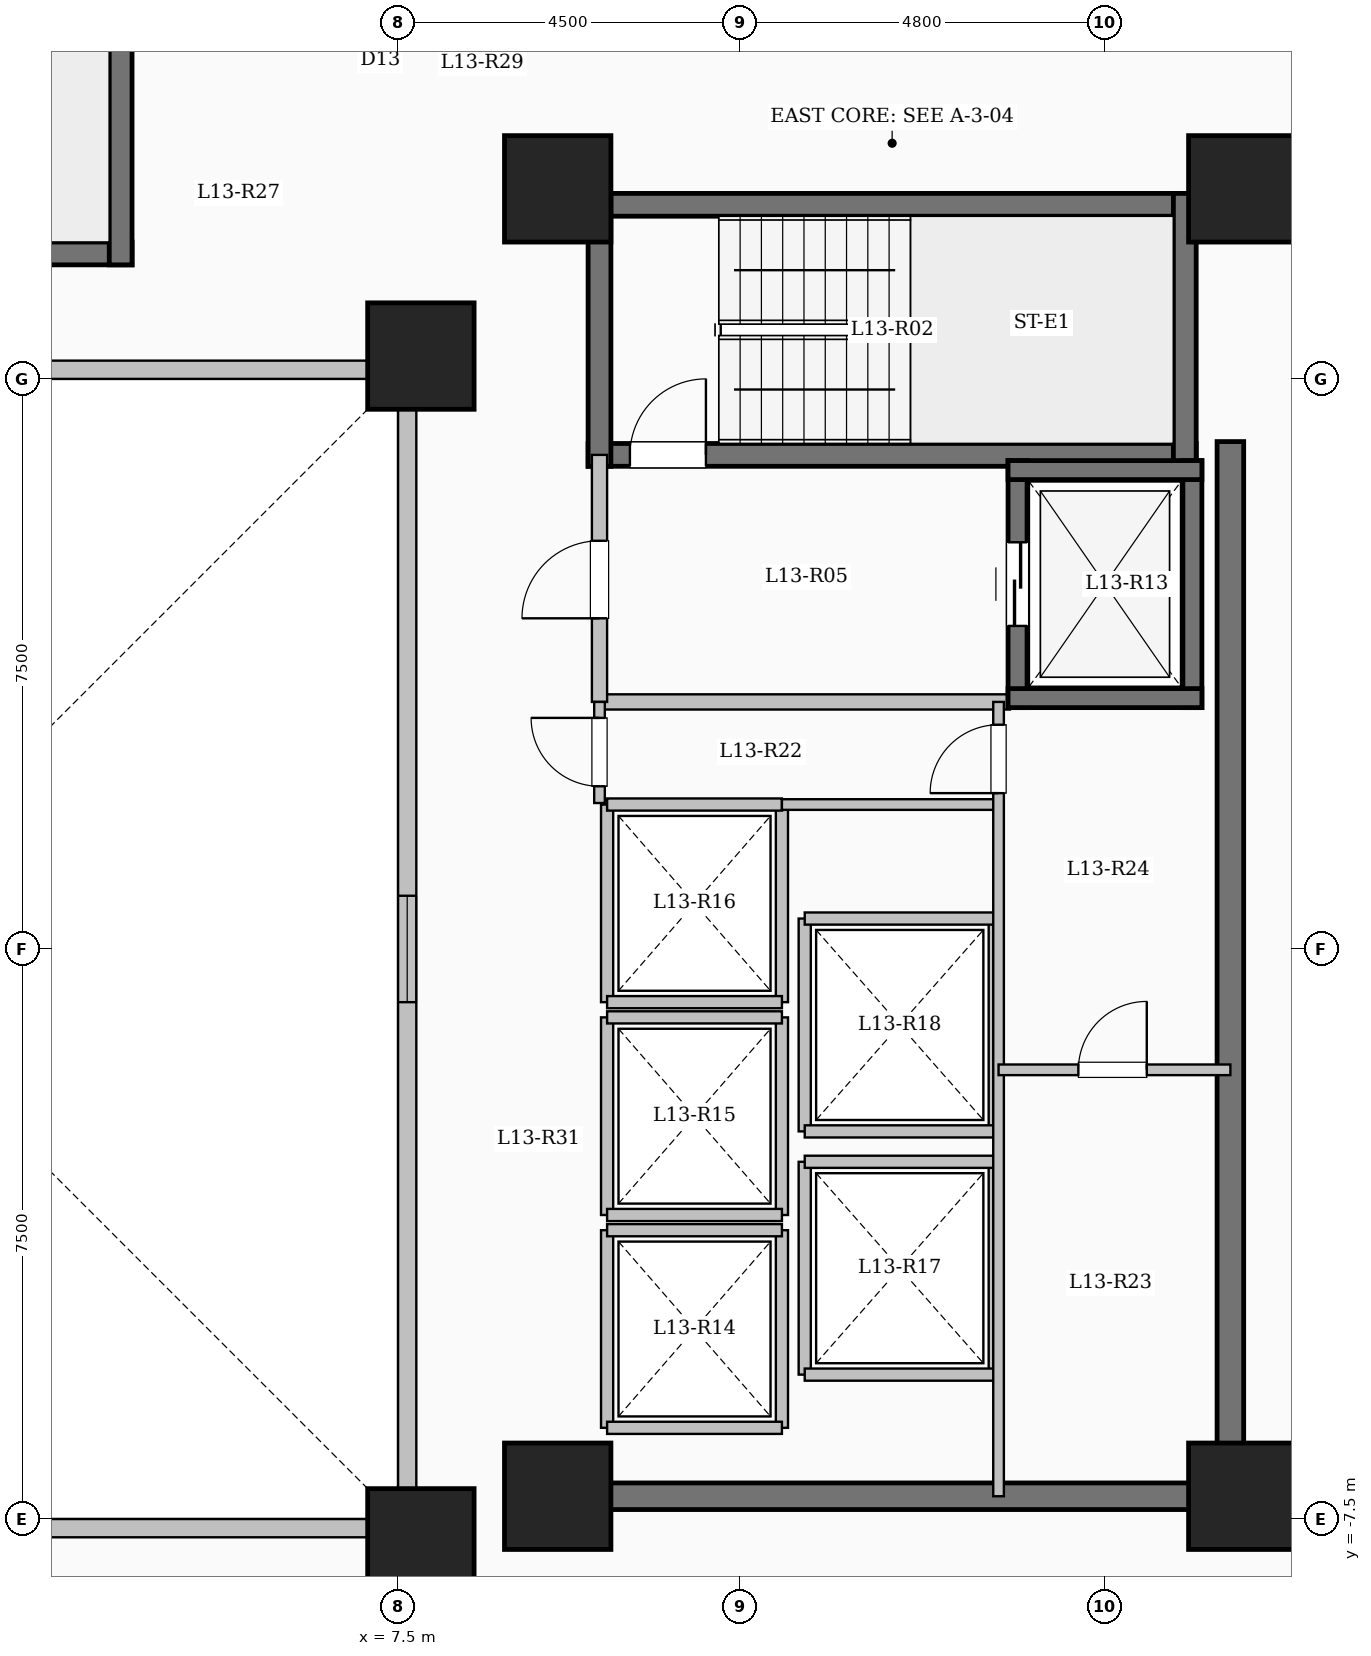
"""IFC4 building model, lengths in metres.
Left out: names, types, materials, properties, quantities, classifications, styles, units other than length and angle.
Written with IfcOpenShell. Run it as: python <this file> out.ifc"""

import sys

from ifc_helpers import new_model, si_unit, direction, frame, frame_2d, origin, origin_2d, place, context, subcontext, project, spatial, rectangle, extrude, element, fill, save


model = new_model("IFC4")
c1 = context("Model", 3, precision=1e-05, world=origin(), true_north=direction((0.0, 1.0)))
c2 = subcontext(c1, "Body", "Model", "MODEL_VIEW")
j1 = project(units=[si_unit("LENGTHUNIT", "METRE"), si_unit("PLANEANGLEUNIT", "RADIAN")], contexts=[c1])
p1 = place(None, origin())
s1 = spatial("IfcSite", under=j1, at=p1, CompositionType="ELEMENT")
p2 = place(p1, origin())
s2 = spatial("IfcBuilding", under=s1, at=p2, CompositionType="ELEMENT")
p3 = place(p2, frame((0.0, 0.0, 50.8)))
s3 = spatial("IfcBuildingStorey", under=s2, at=p3, CompositionType="ELEMENT", Elevation=50.8)
for number, where, z_axis, x_axis in (
    (1, (7.8, -7.8, 0.0), (0.0, 0.0, 1.0), (1.0, 0.0, 0.0)),
    (2, (7.8, 7.8, 0.0), (0.0, 0.0, 1.0), (1.0, 0.0, 0.0)),
    (3, (9.6, -7.2, 0.0), (0.0, 0.0, 1.0), (1.0, 0.0, 0.0)),
    (4, (9.6, 10.0, 0.0), (0.0, 0.0, 1.0), (1.0, 0.0, 0.0)),
    (5, (18.6, -7.2, 0.0), (0.0, 0.0, 1.0), (1.0, 0.0, 0.0)),
    (6, (18.6, 10.0, 0.0), (0.0, 0.0, 1.0), (1.0, 0.0, 0.0)),
):
    element("IfcColumn", number, at=place(p3, frame(where, z_axis=z_axis, x_axis=x_axis)), inside=s3, PredefinedType="COLUMN", context=c2, shape_type="SweptSolid", body=[
        extrude(rectangle(XDim=1.4, YDim=1.4, at=origin_2d()), origin(), (0.0, 0.0, 1.0), 3.35),
    ])
p4 = place(p3, frame((-7.62, -7.62, 0.0), z_axis=(0.0, 0.0, 1.0), x_axis=(1.0, 0.0, 0.0)))
e7 = element("IfcWall", 7, at=p4, inside=s3, PredefinedType="SOLIDWALL", context=c2, shape_type="SweptSolid", body=[
    extrude(rectangle(XDim=15.24, YDim=0.24, at=frame_2d((7.62, 0.0))), origin(), (0.0, 0.0, 1.0), 3.1),
])
p5 = place(p4, frame((6.92, 0.0, 0.95)))
e8 = element("IfcOpeningElement", 8, at=p5, cuts=e7, PredefinedType="OPENING", context=c2, shape_type="SweptSolid", body=[
    extrude(rectangle(XDim=1.4, YDim=1.5, at=frame_2d((0.7, 0.75))), frame((0.0, 0.13, 0.0), z_axis=(0.0, -1.0, 0.0), x_axis=(1.0, 0.0, 0.0)), (0.0, 0.0, 1.0), 0.26),
])
p6 = place(p3, frame((7.62, -7.62, 0.0), z_axis=(0.0, 0.0, 1.0), x_axis=(0.0, 1.0, 0.0)))
e9 = element("IfcWall", 9, at=p6, inside=s3, PredefinedType="SOLIDWALL", context=c2, shape_type="SweptSolid", body=[
    extrude(rectangle(XDim=15.24, YDim=0.24, at=frame_2d((7.62, 0.0))), origin(), (0.0, 0.0, 1.0), 3.1),
])
p7 = place(p6, frame((6.92, 0.0, 0.95)))
e10 = element("IfcOpeningElement", 10, at=p7, cuts=e9, PredefinedType="OPENING", context=c2, shape_type="SweptSolid", body=[
    extrude(rectangle(XDim=1.4, YDim=1.5, at=frame_2d((0.7, 0.75))), frame((0.0, 0.13, 0.0), z_axis=(0.0, -1.0, 0.0), x_axis=(1.0, 0.0, 0.0)), (0.0, 0.0, 1.0), 0.26),
])
p8 = place(p3, frame((7.62, 7.62, 0.0), z_axis=(0.0, 0.0, 1.0), x_axis=(-1.0, 0.0, 0.0)))
e11 = element("IfcWall", 11, at=p8, inside=s3, PredefinedType="SOLIDWALL", context=c2, shape_type="SweptSolid", body=[
    extrude(rectangle(XDim=15.24, YDim=0.24, at=frame_2d((7.62, 0.0))), origin(), (0.0, 0.0, 1.0), 3.1),
])
p9 = place(p8, frame((6.92, 0.0, 0.95)))
e12 = element("IfcOpeningElement", 12, at=p9, cuts=e11, PredefinedType="OPENING", context=c2, shape_type="SweptSolid", body=[
    extrude(rectangle(XDim=1.4, YDim=1.5, at=frame_2d((0.7, 0.75))), frame((0.0, 0.13, 0.0), z_axis=(0.0, -1.0, 0.0), x_axis=(1.0, 0.0, 0.0)), (0.0, 0.0, 1.0), 0.26),
])
p10 = place(p3, frame((10.0, 9.79, 0.0), z_axis=(0.0, 0.0, 1.0), x_axis=(1.0, 0.0, 0.0)))
e13 = element("IfcWall", 13, at=p10, inside=s3, PredefinedType="SHEAR", context=c2, shape_type="SweptSolid", body=[
    extrude(rectangle(XDim=8.0, YDim=0.3, at=frame_2d((4.0, 0.0))), origin(), (0.0, 0.0, 1.0), 3.35),
])
p11 = place(p3, frame((10.0, 6.5, 0.0), z_axis=(0.0, 0.0, 1.0), x_axis=(1.0, 0.0, 0.0)))
e14 = element("IfcWall", 14, at=p11, inside=s3, PredefinedType="SHEAR", context=c2, shape_type="SweptSolid", body=[
    extrude(rectangle(XDim=8.0, YDim=0.3, at=frame_2d((4.0, 0.0))), origin(), (0.0, 0.0, 1.0), 3.35),
])
p12 = place(p11, frame((0.55, 0.0, 0.0)))
e15 = element("IfcOpeningElement", 15, at=p12, cuts=e14, PredefinedType="OPENING", context=c2, shape_type="SweptSolid", body=[
    extrude(rectangle(XDim=1.0, YDim=2.15, at=frame_2d((0.5, 1.075))), frame((0.0, 0.16, 0.0), z_axis=(0.0, -1.0, 0.0), x_axis=(1.0, 0.0, 0.0)), (0.0, 0.0, 1.0), 0.32),
])
for number, where, z_axis, x_axis in (
    (16, (10.15, 6.35, 0.0), (0.0, 0.0, 1.0), (0.0, 1.0, 0.0)),
    (17, (17.85, 6.35, 0.0), (0.0, 0.0, 1.0), (0.0, 1.0, 0.0)),
):
    element("IfcWall", number, at=place(p3, frame(where, z_axis=z_axis, x_axis=x_axis)), inside=s3, PredefinedType="SHEAR", context=c2, shape_type="SweptSolid", body=[
        extrude(rectangle(XDim=3.59, YDim=0.3, at=frame_2d((1.795, 0.0))), origin(), (0.0, 0.0, 1.0), 3.35),
    ])
p13 = place(p3, frame((-4.0, 9.15, 0.0), z_axis=(0.0, 0.0, 1.0), x_axis=(1.0, 0.0, 0.0)))
e18 = element("IfcWall", 18, at=p13, inside=s3, PredefinedType="SHEAR", context=c2, shape_type="SweptSolid", body=[
    extrude(rectangle(XDim=8.0, YDim=0.3, at=frame_2d((4.0, 0.0))), origin(), (0.0, 0.0, 1.0), 3.35),
])
p14 = place(p13, frame((0.55, 0.0, 0.0)))
e19 = element("IfcOpeningElement", 19, at=p14, cuts=e18, PredefinedType="OPENING", context=c2, shape_type="SweptSolid", body=[
    extrude(rectangle(XDim=1.0, YDim=2.15, at=frame_2d((0.5, 1.075))), frame((0.0, 0.16, 0.0), z_axis=(0.0, -1.0, 0.0), x_axis=(1.0, 0.0, 0.0)), (0.0, 0.0, 1.0), 0.32),
])
p15 = place(p3, frame((3.85, 9.0, 0.0), z_axis=(0.0, 0.0, 1.0), x_axis=(0.0, 1.0, 0.0)))
e20 = element("IfcWall", 20, at=p15, inside=s3, PredefinedType="SHEAR", context=c2, shape_type="SweptSolid", body=[
    extrude(rectangle(XDim=3.59, YDim=0.3, at=frame_2d((1.795, 0.0))), origin(), (0.0, 0.0, 1.0), 3.35),
])
p16 = place(p3, frame((10.15, 3.25, 0.0), z_axis=(0.0, 0.0, 1.0), x_axis=(1.0, 0.0, 0.0)))
e21 = element("IfcWall", 21, at=p16, inside=s3, PredefinedType="SOLIDWALL", context=c2, shape_type="SweptSolid", body=[
    extrude(rectangle(XDim=5.4, YDim=0.2, at=frame_2d((2.7, 0.0))), origin(), (0.0, 0.0, 1.0), 3.1),
])
p17 = place(p3, frame((10.15, 3.25, 0.0), z_axis=(0.0, 0.0, 1.0), x_axis=(0.0, 1.0, 0.0)))
e22 = element("IfcWall", 22, at=p17, inside=s3, PredefinedType="SOLIDWALL", context=c2, shape_type="SweptSolid", body=[
    extrude(rectangle(XDim=3.25, YDim=0.2, at=frame_2d((1.625, 0.0))), origin(), (0.0, 0.0, 1.0), 3.1),
])
p18 = place(p17, frame((1.1, 0.0, 0.0)))
e23 = element("IfcOpeningElement", 23, at=p18, cuts=e22, PredefinedType="OPENING", context=c2, shape_type="SweptSolid", body=[
    extrude(rectangle(XDim=1.02, YDim=2.15, at=frame_2d((0.51, 1.075))), frame((0.0, 0.11, 0.0), z_axis=(0.0, -1.0, 0.0), x_axis=(1.0, 0.0, 0.0)), (0.0, 0.0, 1.0), 0.22),
])
p19 = place(p3, frame((15.65, 3.175, 0.0), z_axis=(0.0, 0.0, 1.0), x_axis=(0.0, 1.0, 0.0)))
e24 = element("IfcWall", 24, at=p19, inside=s3, PredefinedType="SHEAR", context=c2, shape_type="SweptSolid", body=[
    extrude(rectangle(XDim=3.25, YDim=0.25, at=frame_2d((1.625, 0.0))), origin(), (0.0, 0.0, 1.0), 3.35),
])
p20 = place(p19, frame((1.075, 0.0, 0.0)))
e25 = element("IfcOpeningElement", 25, at=p20, cuts=e24, PredefinedType="OPENING", context=c2, shape_type="SweptSolid", body=[
    extrude(rectangle(XDim=1.1, YDim=2.15, at=frame_2d((0.55, 1.075))), frame((0.0, 0.135, 0.0), z_axis=(0.0, -1.0, 0.0), x_axis=(1.0, 0.0, 0.0)), (0.0, 0.0, 1.0), 0.27),
])
p21 = place(p3, frame((17.95, 3.175, 0.0), z_axis=(0.0, 0.0, 1.0), x_axis=(0.0, 1.0, 0.0)))
e26 = element("IfcWall", 26, at=p21, inside=s3, PredefinedType="SHEAR", context=c2, shape_type="SweptSolid", body=[
    extrude(rectangle(XDim=3.25, YDim=0.25, at=frame_2d((1.625, 0.0))), origin(), (0.0, 0.0, 1.0), 3.35),
])
for number, where, z_axis, x_axis in (
    (27, (15.525, 3.3, 0.0), (0.0, 0.0, 1.0), (1.0, 0.0, 0.0)),
    (28, (15.525, 6.3, 0.0), (0.0, 0.0, 1.0), (1.0, 0.0, 0.0)),
):
    element("IfcWall", number, at=place(p3, frame(where, z_axis=z_axis, x_axis=x_axis)), inside=s3, PredefinedType="SHEAR", context=c2, shape_type="SweptSolid", body=[
        extrude(rectangle(XDim=2.55, YDim=0.25, at=frame_2d((1.275, 0.0))), origin(), (0.0, 0.0, 1.0), 3.35),
    ])
for number, where, z_axis, x_axis in (
    (29, (10.25, -6.3, 0.0), (0.0, 0.0, 1.0), (0.0, 1.0, 0.0)),
    (30, (12.55, -6.3, 0.0), (0.0, 0.0, 1.0), (0.0, 1.0, 0.0)),
):
    element("IfcWall", number, at=place(p3, frame(where, z_axis=z_axis, x_axis=x_axis)), inside=s3, PredefinedType="SOLIDWALL", context=c2, shape_type="SweptSolid", body=[
        extrude(rectangle(XDim=2.6, YDim=0.16, at=frame_2d((1.3, 0.0))), origin(), (0.0, 0.0, 1.0), 3.1),
    ])
for number, where, z_axis, x_axis in (
    (31, (10.25, -6.3, 0.0), (0.0, 0.0, 1.0), (1.0, 0.0, 0.0)),
    (32, (10.25, -3.7, 0.0), (0.0, 0.0, 1.0), (1.0, 0.0, 0.0)),
):
    element("IfcWall", number, at=place(p3, frame(where, z_axis=z_axis, x_axis=x_axis)), inside=s3, PredefinedType="SOLIDWALL", context=c2, shape_type="SweptSolid", body=[
        extrude(rectangle(XDim=2.3, YDim=0.16, at=frame_2d((1.15, 0.0))), origin(), (0.0, 0.0, 1.0), 3.1),
    ])
for number, where, z_axis, x_axis in (
    (33, (10.25, -3.5, 0.0), (0.0, 0.0, 1.0), (0.0, 1.0, 0.0)),
    (34, (12.55, -3.5, 0.0), (0.0, 0.0, 1.0), (0.0, 1.0, 0.0)),
):
    element("IfcWall", number, at=place(p3, frame(where, z_axis=z_axis, x_axis=x_axis)), inside=s3, PredefinedType="SOLIDWALL", context=c2, shape_type="SweptSolid", body=[
        extrude(rectangle(XDim=2.6, YDim=0.16, at=frame_2d((1.3, 0.0))), origin(), (0.0, 0.0, 1.0), 3.1),
    ])
for number, where, z_axis, x_axis in (
    (35, (10.25, -3.5, 0.0), (0.0, 0.0, 1.0), (1.0, 0.0, 0.0)),
    (36, (10.25, -0.9, 0.0), (0.0, 0.0, 1.0), (1.0, 0.0, 0.0)),
):
    element("IfcWall", number, at=place(p3, frame(where, z_axis=z_axis, x_axis=x_axis)), inside=s3, PredefinedType="SOLIDWALL", context=c2, shape_type="SweptSolid", body=[
        extrude(rectangle(XDim=2.3, YDim=0.16, at=frame_2d((1.15, 0.0))), origin(), (0.0, 0.0, 1.0), 3.1),
    ])
for number, where, z_axis, x_axis in (
    (37, (10.25, -0.7, 0.0), (0.0, 0.0, 1.0), (0.0, 1.0, 0.0)),
    (38, (12.55, -0.7, 0.0), (0.0, 0.0, 1.0), (0.0, 1.0, 0.0)),
):
    element("IfcWall", number, at=place(p3, frame(where, z_axis=z_axis, x_axis=x_axis)), inside=s3, PredefinedType="SOLIDWALL", context=c2, shape_type="SweptSolid", body=[
        extrude(rectangle(XDim=2.6, YDim=0.16, at=frame_2d((1.3, 0.0))), origin(), (0.0, 0.0, 1.0), 3.1),
    ])
for number, where, z_axis, x_axis in (
    (39, (10.25, -0.7, 0.0), (0.0, 0.0, 1.0), (1.0, 0.0, 0.0)),
    (40, (10.25, 1.9, 0.0), (0.0, 0.0, 1.0), (1.0, 0.0, 0.0)),
):
    element("IfcWall", number, at=place(p3, frame(where, z_axis=z_axis, x_axis=x_axis)), inside=s3, PredefinedType="SOLIDWALL", context=c2, shape_type="SweptSolid", body=[
        extrude(rectangle(XDim=2.3, YDim=0.16, at=frame_2d((1.15, 0.0))), origin(), (0.0, 0.0, 1.0), 3.1),
    ])
for number, where, z_axis, x_axis in (
    (41, (12.85, -5.6, 0.0), (0.0, 0.0, 1.0), (0.0, 1.0, 0.0)),
    (42, (15.35, -5.6, 0.0), (0.0, 0.0, 1.0), (0.0, 1.0, 0.0)),
):
    element("IfcWall", number, at=place(p3, frame(where, z_axis=z_axis, x_axis=x_axis)), inside=s3, PredefinedType="SOLIDWALL", context=c2, shape_type="SweptSolid", body=[
        extrude(rectangle(XDim=2.8, YDim=0.16, at=frame_2d((1.4, 0.0))), origin(), (0.0, 0.0, 1.0), 3.1),
    ])
for number, where, z_axis, x_axis in (
    (43, (12.85, -5.6, 0.0), (0.0, 0.0, 1.0), (1.0, 0.0, 0.0)),
    (44, (12.85, -2.8, 0.0), (0.0, 0.0, 1.0), (1.0, 0.0, 0.0)),
):
    element("IfcWall", number, at=place(p3, frame(where, z_axis=z_axis, x_axis=x_axis)), inside=s3, PredefinedType="SOLIDWALL", context=c2, shape_type="SweptSolid", body=[
        extrude(rectangle(XDim=2.5, YDim=0.16, at=frame_2d((1.25, 0.0))), origin(), (0.0, 0.0, 1.0), 3.1),
    ])
for number, where, z_axis, x_axis in (
    (45, (12.85, -2.4, 0.0), (0.0, 0.0, 1.0), (0.0, 1.0, 0.0)),
    (46, (15.35, -2.4, 0.0), (0.0, 0.0, 1.0), (0.0, 1.0, 0.0)),
):
    element("IfcWall", number, at=place(p3, frame(where, z_axis=z_axis, x_axis=x_axis)), inside=s3, PredefinedType="SOLIDWALL", context=c2, shape_type="SweptSolid", body=[
        extrude(rectangle(XDim=2.8, YDim=0.16, at=frame_2d((1.4, 0.0))), origin(), (0.0, 0.0, 1.0), 3.1),
    ])
for number, where, z_axis, x_axis in (
    (47, (12.85, -2.4, 0.0), (0.0, 0.0, 1.0), (1.0, 0.0, 0.0)),
    (48, (12.85, 0.4, 0.0), (0.0, 0.0, 1.0), (1.0, 0.0, 0.0)),
):
    element("IfcWall", number, at=place(p3, frame(where, z_axis=z_axis, x_axis=x_axis)), inside=s3, PredefinedType="SOLIDWALL", context=c2, shape_type="SweptSolid", body=[
        extrude(rectangle(XDim=2.5, YDim=0.16, at=frame_2d((1.25, 0.0))), origin(), (0.0, 0.0, 1.0), 3.1),
    ])
p22 = place(p3, frame((18.45, -7.375, 0.0), z_axis=(0.0, 0.0, 1.0), x_axis=(0.0, 1.0, 0.0)))
e49 = element("IfcWall", 49, at=p22, inside=s3, PredefinedType="SHEAR", context=c2, shape_type="SweptSolid", body=[
    extrude(rectangle(XDim=14.05, YDim=0.35, at=frame_2d((7.025, 0.0))), origin(), (0.0, 0.0, 1.0), 3.35),
])
p23 = place(p3, frame((10.075, -7.2, 0.0), z_axis=(0.0, 0.0, 1.0), x_axis=(1.0, 0.0, 0.0)))
e50 = element("IfcWall", 50, at=p23, inside=s3, PredefinedType="SHEAR", context=c2, shape_type="SweptSolid", body=[
    extrude(rectangle(XDim=8.55, YDim=0.35, at=frame_2d((4.275, 0.0))), origin(), (0.0, 0.0, 1.0), 3.35),
])
p24 = place(p3, frame((12.55, 1.9, 0.0), z_axis=(0.0, 0.0, 1.0), x_axis=(1.0, 0.0, 0.0)))
e51 = element("IfcWall", 51, at=p24, inside=s3, PredefinedType="PARTITIONING", context=c2, shape_type="SweptSolid", body=[
    extrude(rectangle(XDim=2.85, YDim=0.14, at=frame_2d((1.425, 0.0))), origin(), (0.0, 0.0, 1.0), 3.1),
])
p25 = place(p3, frame((10.15, 1.92, 0.0), z_axis=(0.0, 0.0, 1.0), x_axis=(0.0, 1.0, 0.0)))
e52 = element("IfcWall", 52, at=p25, inside=s3, PredefinedType="PARTITIONING", context=c2, shape_type="SweptSolid", body=[
    extrude(rectangle(XDim=1.33, YDim=0.14, at=frame_2d((0.665, 0.0))), origin(), (0.0, 0.0, 1.0), 3.1),
])
p26 = place(p25, frame((0.22, 0.0, 0.0)))
e53 = element("IfcOpeningElement", 53, at=p26, cuts=e52, PredefinedType="OPENING", context=c2, shape_type="SweptSolid", body=[
    extrude(rectangle(XDim=0.9, YDim=2.08, at=frame_2d((0.45, 1.04))), frame((0.0, 0.08, 0.0), z_axis=(0.0, -1.0, 0.0), x_axis=(1.0, 0.0, 0.0)), (0.0, 0.0, 1.0), 0.16),
])
p27 = place(p3, frame((15.4, -7.2, 0.0), z_axis=(0.0, 0.0, 1.0), x_axis=(0.0, 1.0, 0.0)))
e54 = element("IfcWall", 54, at=p27, inside=s3, PredefinedType="PARTITIONING", context=c2, shape_type="SweptSolid", body=[
    extrude(rectangle(XDim=10.45, YDim=0.14, at=frame_2d((5.225, 0.0))), origin(), (0.0, 0.0, 1.0), 3.1),
])
p28 = place(p27, frame((9.25, 0.0, 0.0)))
e55 = element("IfcOpeningElement", 55, at=p28, cuts=e54, PredefinedType="OPENING", context=c2, shape_type="SweptSolid", body=[
    extrude(rectangle(XDim=0.9, YDim=2.08, at=frame_2d((0.45, 1.04))), frame((0.0, 0.08, 0.0), z_axis=(0.0, -1.0, 0.0), x_axis=(1.0, 0.0, 0.0)), (0.0, 0.0, 1.0), 0.16),
])
p29 = place(p3, frame((15.4, -1.59, 0.0), z_axis=(0.0, 0.0, 1.0), x_axis=(1.0, 0.0, 0.0)))
e56 = element("IfcWall", 56, at=p29, inside=s3, PredefinedType="PARTITIONING", context=c2, shape_type="SweptSolid", body=[
    extrude(rectangle(XDim=3.05, YDim=0.14, at=frame_2d((1.525, 0.0))), origin(), (0.0, 0.0, 1.0), 3.1),
])
p30 = place(p29, frame((1.05, 0.0, 0.0)))
e57 = element("IfcOpeningElement", 57, at=p30, cuts=e56, PredefinedType="OPENING", context=c2, shape_type="SweptSolid", body=[
    extrude(rectangle(XDim=0.9, YDim=2.08, at=frame_2d((0.45, 1.04))), frame((0.0, 0.08, 0.0), z_axis=(0.0, -1.0, 0.0), x_axis=(1.0, 0.0, 0.0)), (0.0, 0.0, 1.0), 0.16),
])
p31 = place(p7, origin())
e58 = element("IfcWindow", 58, at=p31, inside=s3, PartitioningType="SINGLE_PANEL", PredefinedType="WINDOW", context=c2, shape_type="SweptSolid", body=[
    extrude(rectangle(XDim=1.4, YDim=1.5, at=frame_2d((0.7, 0.75))), frame((0.0, 0.03, 0.0), z_axis=(0.0, -1.0, 0.0), x_axis=(1.0, 0.0, 0.0)), (0.0, 0.0, 1.0), 0.06),
])
fill(e10, e58)
p32 = place(p12, origin())
e59 = element("IfcDoor", 59, at=p32, inside=s3, OperationType="SINGLE_SWING_RIGHT", PredefinedType="DOOR", context=c2, shape_type="SweptSolid", body=[
    extrude(rectangle(XDim=1.0, YDim=2.15, at=frame_2d((0.5, 1.075))), frame((0.0, 0.025, 0.0), z_axis=(0.0, -1.0, 0.0), x_axis=(1.0, 0.0, 0.0)), (0.0, 0.0, 1.0), 0.05),
])
fill(e15, e59)
p33 = place(p18, origin())
e60 = element("IfcDoor", 60, at=p33, inside=s3, OperationType="SINGLE_SWING_LEFT", PredefinedType="DOOR", context=c2, shape_type="SweptSolid", body=[
    extrude(rectangle(XDim=1.02, YDim=2.15, at=frame_2d((0.51, 1.075))), frame((0.0, 0.025, 0.0), z_axis=(0.0, -1.0, 0.0), x_axis=(1.0, 0.0, 0.0)), (0.0, 0.0, 1.0), 0.05),
])
fill(e23, e60)
p34 = place(p20, origin())
e61 = element("IfcDoor", 61, at=p34, inside=s3, OperationType="SLIDING_TO_LEFT", PredefinedType="DOOR", context=c2, shape_type="SweptSolid", body=[
    extrude(rectangle(XDim=1.1, YDim=2.15, at=frame_2d((0.55, 1.075))), frame((0.0, 0.025, 0.0), z_axis=(0.0, -1.0, 0.0), x_axis=(1.0, 0.0, 0.0)), (0.0, 0.0, 1.0), 0.05),
])
fill(e25, e61)
p35 = place(p26, origin())
e62 = element("IfcDoor", 62, at=p35, inside=s3, OperationType="SINGLE_SWING_RIGHT", PredefinedType="DOOR", context=c2, shape_type="SweptSolid", body=[
    extrude(rectangle(XDim=0.9, YDim=2.08, at=frame_2d((0.45, 1.04))), frame((0.0, 0.025, 0.0), z_axis=(0.0, -1.0, 0.0), x_axis=(1.0, 0.0, 0.0)), (0.0, 0.0, 1.0), 0.05),
])
fill(e53, e62)
p36 = place(p28, origin())
e63 = element("IfcDoor", 63, at=p36, inside=s3, OperationType="SINGLE_SWING_LEFT", PredefinedType="DOOR", context=c2, shape_type="SweptSolid", body=[
    extrude(rectangle(XDim=0.9, YDim=2.08, at=frame_2d((0.45, 1.04))), frame((0.0, 0.025, 0.0), z_axis=(0.0, -1.0, 0.0), x_axis=(1.0, 0.0, 0.0)), (0.0, 0.0, 1.0), 0.05),
])
fill(e55, e63)
p37 = place(p30, origin())
e64 = element("IfcDoor", 64, at=p37, inside=s3, OperationType="SINGLE_SWING_RIGHT", PredefinedType="DOOR", context=c2, shape_type="SweptSolid", body=[
    extrude(rectangle(XDim=0.9, YDim=2.08, at=frame_2d((0.45, 1.04))), frame((0.0, 0.025, 0.0), z_axis=(0.0, -1.0, 0.0), x_axis=(1.0, 0.0, 0.0)), (0.0, 0.0, 1.0), 0.05),
])
fill(e57, e64)
save(model, sys.argv[1])
